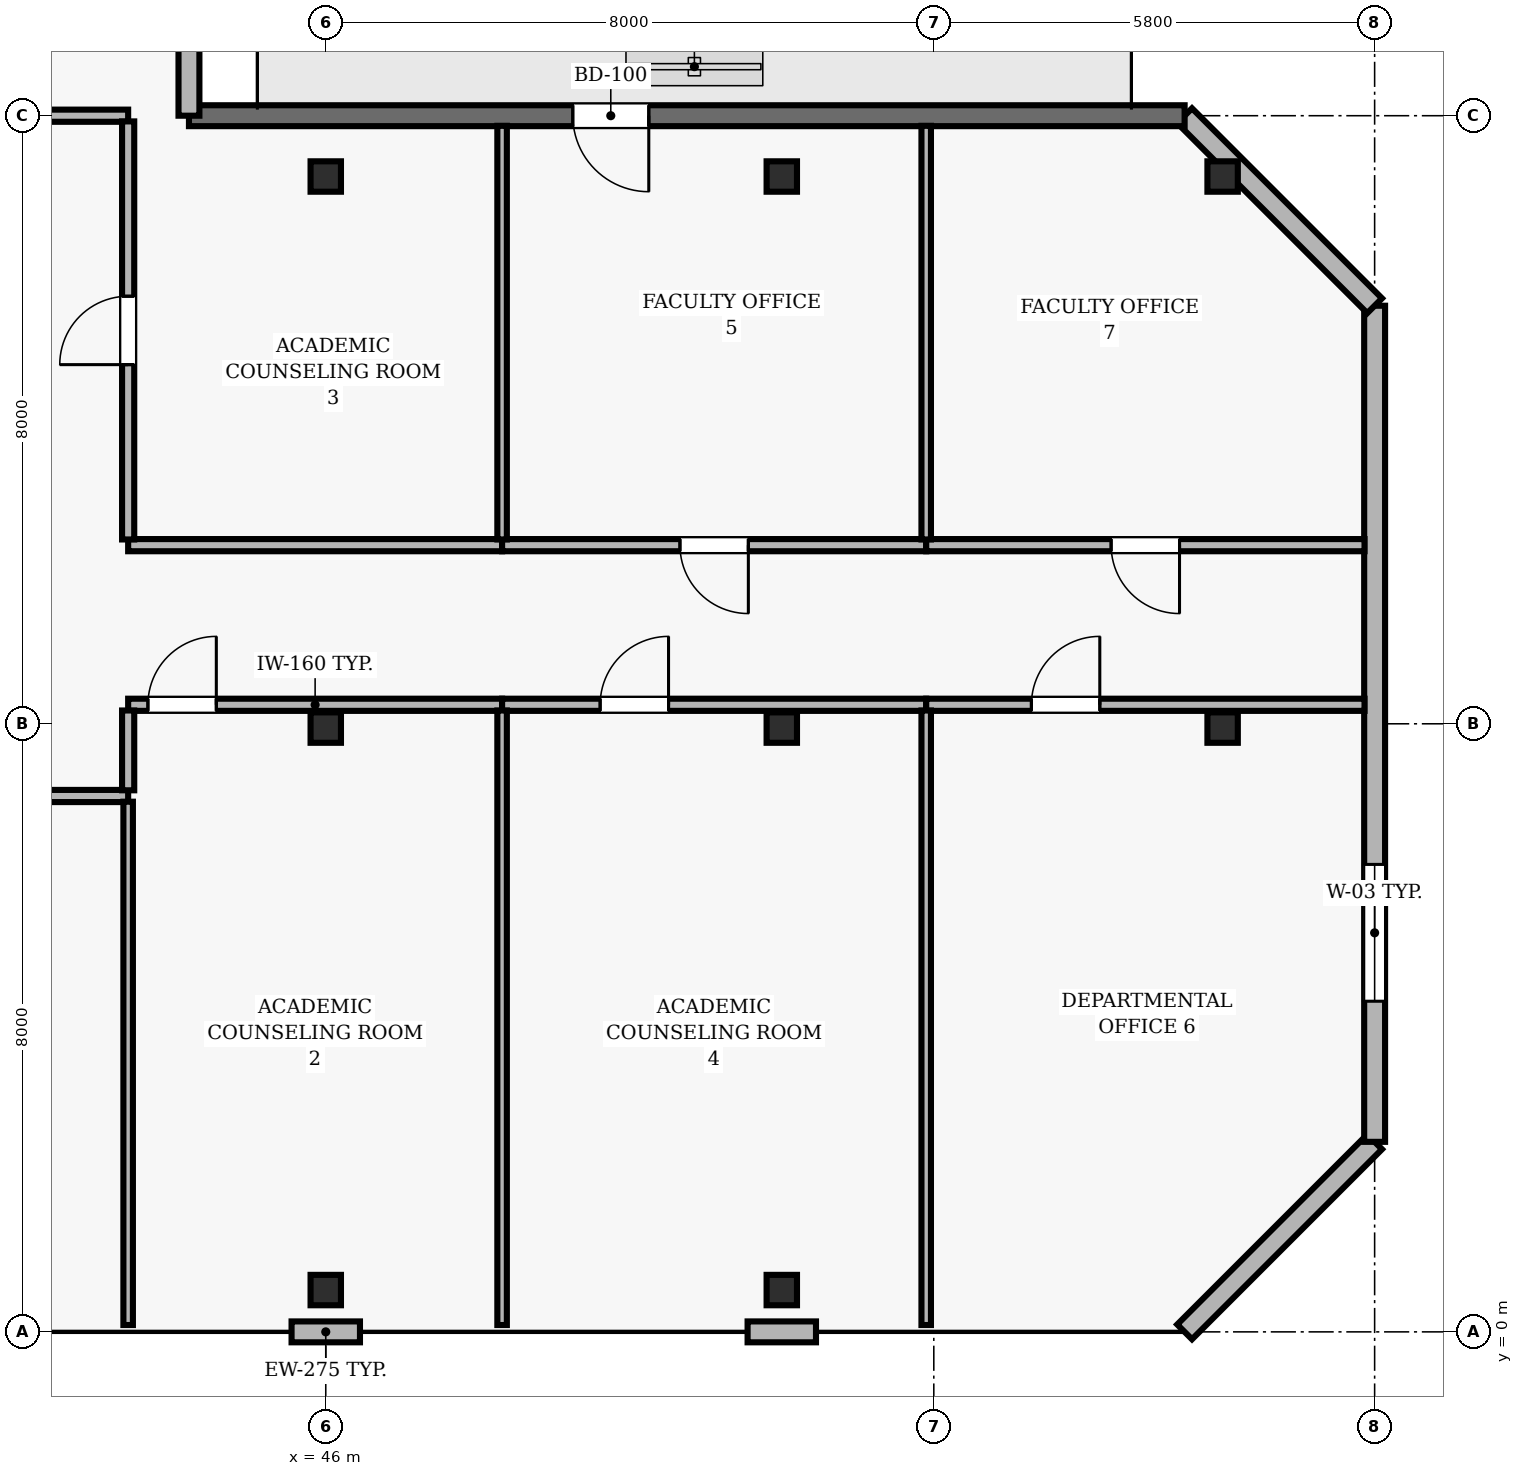
"""IFC4 building model, lengths in metres.
Left out: names, types, materials, properties, quantities, classifications, styles, units other than length and angle.
Written with IfcOpenShell. Run it as: python <this file> out.ifc"""

import sys

from ifc_helpers import new_model, si_unit, direction, frame, frame_2d, origin, origin_2d, place, context, subcontext, project, spatial, rectangle, hollow_rectangle, extrude, element, fill, save


model = new_model("IFC4")
c1 = context("Model", 3, precision=1e-05, world=origin(), true_north=direction((0.0, 1.0)))
c2 = subcontext(c1, "Body", "Model", "MODEL_VIEW")
j1 = project(units=[si_unit("LENGTHUNIT", "METRE"), si_unit("PLANEANGLEUNIT", "RADIAN")], contexts=[c1])
p1 = place(None, origin())
s1 = spatial("IfcSite", under=j1, at=p1, CompositionType="ELEMENT")
p2 = place(p1, origin())
s2 = spatial("IfcBuilding", under=s1, at=p2, CompositionType="ELEMENT")
p3 = place(p2, frame((0.0, 0.0, 295.0)))
s3 = spatial("IfcBuildingStorey", under=s2, at=p3, CompositionType="ELEMENT", Elevation=295.0)
for number, where, z_axis, x_axis in (
    (1, (46.0, 0.55, 0.0), (0.0, 0.0, 1.0), (1.0, 0.0, 0.0)),
    (2, (46.0, 7.95, 0.0), (0.0, 0.0, 1.0), (1.0, 0.0, 0.0)),
    (3, (46.0, 15.2, 0.0), (0.0, 0.0, 1.0), (1.0, 0.0, 0.0)),
    (4, (52.0, 0.55, 0.0), (0.0, 0.0, 1.0), (1.0, 0.0, 0.0)),
    (5, (52.0, 7.95, 0.0), (0.0, 0.0, 1.0), (1.0, 0.0, 0.0)),
    (6, (52.0, 15.2, 0.0), (0.0, 0.0, 1.0), (1.0, 0.0, 0.0)),
    (7, (57.8, 7.95, 0.0), (0.0, 0.0, 1.0), (1.0, 0.0, 0.0)),
    (8, (57.8, 15.2, 0.0), (0.0, 0.0, 1.0), (1.0, 0.0, 0.0)),
):
    element("IfcColumn", number, at=place(p3, frame(where, z_axis=z_axis, x_axis=x_axis)), inside=s3, PredefinedType="COLUMN", context=c2, shape_type="SweptSolid", body=[
        extrude(hollow_rectangle(XDim=0.4, YDim=0.4, WallThickness=0.02, at=origin_2d()), origin(), (0.0, 0.0, 1.0), 3.9),
    ])
for number, where, z_axis, x_axis in (
    (9, (45.55, 0.0, 0.0), (0.0, 0.0, 1.0), (1.0, 0.0, 0.0)),
    (10, (51.55, 0.0, 0.0), (0.0, 0.0, 1.0), (1.0, 0.0, 0.0)),
):
    element("IfcWall", number, at=place(p3, frame(where, z_axis=z_axis, x_axis=x_axis)), inside=s3, PredefinedType="SOLIDWALL", context=c2, shape_type="SweptSolid", body=[
        extrude(rectangle(XDim=0.9, YDim=0.275, at=frame_2d((0.45, 0.0))), origin(), (0.0, 0.0, 1.0), 3.69),
    ])
p4 = place(p3, frame((57.3, 0.0, 0.0), z_axis=(0.0, 0.0, 1.0), x_axis=(0.707106781187, 0.707106781187, 0.0)))
e11 = element("IfcWall", 11, at=p4, inside=s3, PredefinedType="SOLIDWALL", context=c2, shape_type="SweptSolid", body=[
    extrude(rectangle(XDim=3.536, YDim=0.275, at=frame_2d((1.768, 0.0))), origin(), (0.0, 0.0, 1.0), 3.69),
])
p5 = place(p3, frame((59.8, 2.5, 0.0), z_axis=(0.0, 0.0, 1.0), x_axis=(0.0, 1.0, 0.0)))
e12 = element("IfcWall", 12, at=p5, inside=s3, PredefinedType="SOLIDWALL", context=c2, shape_type="SweptSolid", body=[
    extrude(rectangle(XDim=11.0, YDim=0.275, at=frame_2d((5.5, 0.0))), origin(), (0.0, 0.0, 1.0), 3.69),
])
p6 = place(p5, frame((1.85, 0.0, 0.9)))
e13 = element("IfcOpeningElement", 13, at=p6, cuts=e12, PredefinedType="OPENING", context=c2, shape_type="SweptSolid", body=[
    extrude(rectangle(XDim=1.8, YDim=1.6, at=frame_2d((0.9, 0.8))), frame((0.0, 0.147, 0.0), z_axis=(0.0, -1.0, 0.0), x_axis=(1.0, 0.0, 0.0)), (0.0, 0.0, 1.0), 0.295),
])
p7 = place(p3, frame((59.8, 13.5, 0.0), z_axis=(0.0, 0.0, 1.0), x_axis=(-0.707106781187, 0.707106781187, 0.0)))
e14 = element("IfcWall", 14, at=p7, inside=s3, PredefinedType="SOLIDWALL", context=c2, shape_type="SweptSolid", body=[
    extrude(rectangle(XDim=3.536, YDim=0.275, at=frame_2d((1.768, 0.0))), origin(), (0.0, 0.0, 1.0), 3.69),
])
p8 = place(p3, frame((57.3, 16.0, 0.0), z_axis=(0.0, 0.0, 1.0), x_axis=(-1.0, 0.0, 0.0)))
e15 = element("IfcWall", 15, at=p8, inside=s3, PredefinedType="SOLIDWALL", context=c2, shape_type="SweptSolid", body=[
    extrude(rectangle(XDim=13.1, YDim=0.275, at=frame_2d((6.55, 0.0))), origin(), (0.0, 0.0, 1.0), 3.69),
])
p9 = place(p8, frame((7.05, 0.0, 0.0)))
e16 = element("IfcOpeningElement", 16, at=p9, cuts=e15, PredefinedType="OPENING", context=c2, shape_type="SweptSolid", body=[
    extrude(rectangle(XDim=1.0, YDim=2.2, at=frame_2d((0.5, 1.1))), frame((0.0, 0.147, 0.0), z_axis=(0.0, -1.0, 0.0), x_axis=(1.0, 0.0, 0.0)), (0.0, 0.0, 1.0), 0.295),
])
p10 = place(p3, frame((44.2, 16.0, 0.0), z_axis=(0.0, 0.0, 1.0), x_axis=(0.0, 1.0, 0.0)))
e17 = element("IfcWall", 17, at=p10, inside=s3, PredefinedType="SOLIDWALL", context=c2, shape_type="SweptSolid", body=[
    extrude(rectangle(XDim=4.4, YDim=0.275, at=frame_2d((2.2, 0.0))), origin(), (0.0, 0.0, 1.0), 3.69),
])
p11 = place(p3, frame((38.05, 7.05, 0.0), z_axis=(0.0, 0.0, 1.0), x_axis=(1.0, 0.0, 0.0)))
e18 = element("IfcWall", 18, at=p11, inside=s3, PredefinedType="PARTITIONING", context=c2, shape_type="SweptSolid", body=[
    extrude(rectangle(XDim=5.35, YDim=0.16, at=frame_2d((2.675, 0.0))), origin(), (0.0, 0.0, 1.0), 3.69),
])
p12 = place(p11, frame((2.225, 0.0, 0.0)))
e19 = element("IfcOpeningElement", 19, at=p12, cuts=e18, PredefinedType="OPENING", context=c2, shape_type="SweptSolid", body=[
    extrude(rectangle(XDim=0.9, YDim=2.1, at=frame_2d((0.45, 1.05))), frame((0.0, 0.09, 0.0), z_axis=(0.0, -1.0, 0.0), x_axis=(1.0, 0.0, 0.0)), (0.0, 0.0, 1.0), 0.18),
])
p13 = place(p3, frame((43.4, 8.25, 0.0), z_axis=(0.0, 0.0, 1.0), x_axis=(1.0, 0.0, 0.0)))
e20 = element("IfcWall", 20, at=p13, inside=s3, PredefinedType="PARTITIONING", context=c2, shape_type="SweptSolid", body=[
    extrude(rectangle(XDim=4.92, YDim=0.16, at=frame_2d((2.46, 0.0))), origin(), (0.0, 0.0, 1.0), 3.221),
])
p14 = place(p13, frame((0.26, 0.0, 0.0)))
e21 = element("IfcOpeningElement", 21, at=p14, cuts=e20, PredefinedType="OPENING", context=c2, shape_type="SweptSolid", body=[
    extrude(rectangle(XDim=0.9, YDim=2.1, at=frame_2d((0.45, 1.05))), frame((0.0, 0.09, 0.0), z_axis=(0.0, -1.0, 0.0), x_axis=(1.0, 0.0, 0.0)), (0.0, 0.0, 1.0), 0.18),
])
p15 = place(p3, frame((43.4, 16.0, 0.0), z_axis=(0.0, 0.0, 1.0), x_axis=(-1.0, 0.0, 0.0)))
e22 = element("IfcWall", 22, at=p15, inside=s3, PredefinedType="PARTITIONING", context=c2, shape_type="SweptSolid", body=[
    extrude(rectangle(XDim=5.35, YDim=0.16, at=frame_2d((2.675, 0.0))), origin(), (0.0, 0.0, 1.0), 3.39),
])
p16 = place(p15, frame((2.225, 0.0, 0.0)))
e23 = element("IfcOpeningElement", 23, at=p16, cuts=e22, PredefinedType="OPENING", context=c2, shape_type="SweptSolid", body=[
    extrude(rectangle(XDim=0.9, YDim=2.1, at=frame_2d((0.45, 1.05))), frame((0.0, 0.09, 0.0), z_axis=(0.0, -1.0, 0.0), x_axis=(1.0, 0.0, 0.0)), (0.0, 0.0, 1.0), 0.18),
])
p17 = place(p3, frame((48.32, 8.25, 0.0), z_axis=(0.0, 0.0, 1.0), x_axis=(1.0, 0.0, 0.0)))
e24 = element("IfcWall", 24, at=p17, inside=s3, PredefinedType="PARTITIONING", context=c2, shape_type="SweptSolid", body=[
    extrude(rectangle(XDim=5.58, YDim=0.16, at=frame_2d((2.79, 0.0))), origin(), (0.0, 0.0, 1.0), 3.221),
])
p18 = place(p17, frame((1.29, 0.0, 0.0)))
e25 = element("IfcOpeningElement", 25, at=p18, cuts=e24, PredefinedType="OPENING", context=c2, shape_type="SweptSolid", body=[
    extrude(rectangle(XDim=0.9, YDim=2.1, at=frame_2d((0.45, 1.05))), frame((0.0, 0.09, 0.0), z_axis=(0.0, -1.0, 0.0), x_axis=(1.0, 0.0, 0.0)), (0.0, 0.0, 1.0), 0.18),
])
p19 = place(p3, frame((48.32, 10.35, 0.0), z_axis=(0.0, 0.0, 1.0), x_axis=(-1.0, 0.0, 0.0)))
e26 = element("IfcWall", 26, at=p19, inside=s3, PredefinedType="PARTITIONING", context=c2, shape_type="SweptSolid", body=[
    extrude(rectangle(XDim=4.92, YDim=0.16, at=frame_2d((2.46, 0.0))), origin(), (0.0, 0.0, 1.0), 3.372),
])
p20 = place(p3, frame((53.9, 8.25, 0.0), z_axis=(0.0, 0.0, 1.0), x_axis=(1.0, 0.0, 0.0)))
e27 = element("IfcWall", 27, at=p20, inside=s3, PredefinedType="PARTITIONING", context=c2, shape_type="SweptSolid", body=[
    extrude(rectangle(XDim=5.767, YDim=0.16, at=frame_2d((2.884, 0.0))), origin(), (0.0, 0.0, 1.0), 3.221),
])
p21 = place(p20, frame((1.384, 0.0, 0.0)))
e28 = element("IfcOpeningElement", 28, at=p21, cuts=e27, PredefinedType="OPENING", context=c2, shape_type="SweptSolid", body=[
    extrude(rectangle(XDim=0.9, YDim=2.1, at=frame_2d((0.45, 1.05))), frame((0.0, 0.09, 0.0), z_axis=(0.0, -1.0, 0.0), x_axis=(1.0, 0.0, 0.0)), (0.0, 0.0, 1.0), 0.18),
])
p22 = place(p3, frame((53.9, 10.35, 0.0), z_axis=(0.0, 0.0, 1.0), x_axis=(-1.0, 0.0, 0.0)))
e29 = element("IfcWall", 29, at=p22, inside=s3, PredefinedType="PARTITIONING", context=c2, shape_type="SweptSolid", body=[
    extrude(rectangle(XDim=5.58, YDim=0.16, at=frame_2d((2.79, 0.0))), origin(), (0.0, 0.0, 1.0), 3.372),
])
p23 = place(p22, frame((2.34, 0.0, 0.0)))
e30 = element("IfcOpeningElement", 30, at=p23, cuts=e29, PredefinedType="OPENING", context=c2, shape_type="SweptSolid", body=[
    extrude(rectangle(XDim=0.9, YDim=2.1, at=frame_2d((0.45, 1.05))), frame((0.0, 0.09, 0.0), z_axis=(0.0, -1.0, 0.0), x_axis=(1.0, 0.0, 0.0)), (0.0, 0.0, 1.0), 0.18),
])
p24 = place(p3, frame((59.667, 10.35, 0.0), z_axis=(0.0, 0.0, 1.0), x_axis=(-1.0, 0.0, 0.0)))
e31 = element("IfcWall", 31, at=p24, inside=s3, PredefinedType="PARTITIONING", context=c2, shape_type="SweptSolid", body=[
    extrude(rectangle(XDim=5.767, YDim=0.16, at=frame_2d((2.884, 0.0))), origin(), (0.0, 0.0, 1.0), 3.372),
])
p25 = place(p24, frame((2.434, 0.0, 0.0)))
e32 = element("IfcOpeningElement", 32, at=p25, cuts=e31, PredefinedType="OPENING", context=c2, shape_type="SweptSolid", body=[
    extrude(rectangle(XDim=0.9, YDim=2.1, at=frame_2d((0.45, 1.05))), frame((0.0, 0.09, 0.0), z_axis=(0.0, -1.0, 0.0), x_axis=(1.0, 0.0, 0.0)), (0.0, 0.0, 1.0), 0.18),
])
p26 = place(p3, frame((43.4, 0.09, 0.0), z_axis=(0.0, 0.0, 1.0), x_axis=(0.0, 1.0, 0.0)))
e33 = element("IfcWall", 33, at=p26, inside=s3, PredefinedType="PARTITIONING", context=c2, shape_type="SweptSolid", body=[
    extrude(rectangle(XDim=6.885, YDim=0.125, at=frame_2d((3.442, 0.0))), origin(), (0.0, 0.0, 1.0), 3.69),
])
p27 = place(p3, frame((43.4, 7.125, 0.0), z_axis=(0.0, 0.0, 1.0), x_axis=(0.0, 1.0, 0.0)))
e34 = element("IfcWall", 34, at=p27, inside=s3, PredefinedType="PARTITIONING", context=c2, shape_type="SweptSolid", body=[
    extrude(rectangle(XDim=1.05, YDim=0.16, at=frame_2d((0.525, 0.0))), origin(), (0.0, 0.0, 1.0), 3.69),
])
p28 = place(p3, frame((43.4, 10.425, 0.0), z_axis=(0.0, 0.0, 1.0), x_axis=(0.0, 1.0, 0.0)))
e35 = element("IfcWall", 35, at=p28, inside=s3, PredefinedType="PARTITIONING", context=c2, shape_type="SweptSolid", body=[
    extrude(rectangle(XDim=5.5, YDim=0.16, at=frame_2d((2.75, 0.0))), origin(), (0.0, 0.0, 1.0), 3.69),
])
p29 = place(p28, frame((2.3, 0.0, 0.0)))
e36 = element("IfcOpeningElement", 36, at=p29, cuts=e35, PredefinedType="OPENING", context=c2, shape_type="SweptSolid", body=[
    extrude(rectangle(XDim=0.9, YDim=2.1, at=frame_2d((0.45, 1.05))), frame((0.0, 0.09, 0.0), z_axis=(0.0, -1.0, 0.0), x_axis=(1.0, 0.0, 0.0)), (0.0, 0.0, 1.0), 0.18),
])
p30 = place(p3, frame((48.32, 0.09, 0.0), z_axis=(0.0, 0.0, 1.0), x_axis=(0.0, 1.0, 0.0)))
e37 = element("IfcWall", 37, at=p30, inside=s3, PredefinedType="PARTITIONING", context=c2, shape_type="SweptSolid", body=[
    extrude(rectangle(XDim=8.085, YDim=0.125, at=frame_2d((4.042, 0.0))), origin(), (0.0, 0.0, 1.0), 3.69),
])
p31 = place(p3, frame((48.32, 10.425, 0.0), z_axis=(0.0, 0.0, 1.0), x_axis=(0.0, 1.0, 0.0)))
e38 = element("IfcWall", 38, at=p31, inside=s3, PredefinedType="PARTITIONING", context=c2, shape_type="SweptSolid", body=[
    extrude(rectangle(XDim=5.442, YDim=0.125, at=frame_2d((2.721, 0.0))), origin(), (0.0, 0.0, 1.0), 3.69),
])
p32 = place(p3, frame((53.9, 0.09, 0.0), z_axis=(0.0, 0.0, 1.0), x_axis=(0.0, 1.0, 0.0)))
e39 = element("IfcWall", 39, at=p32, inside=s3, PredefinedType="PARTITIONING", context=c2, shape_type="SweptSolid", body=[
    extrude(rectangle(XDim=8.085, YDim=0.125, at=frame_2d((4.042, 0.0))), origin(), (0.0, 0.0, 1.0), 3.69),
])
p33 = place(p3, frame((53.9, 10.425, 0.0), z_axis=(0.0, 0.0, 1.0), x_axis=(0.0, 1.0, 0.0)))
e40 = element("IfcWall", 40, at=p33, inside=s3, PredefinedType="PARTITIONING", context=c2, shape_type="SweptSolid", body=[
    extrude(rectangle(XDim=5.442, YDim=0.125, at=frame_2d((2.721, 0.0))), origin(), (0.0, 0.0, 1.0), 3.69),
])
p34 = place(p6, origin())
e41 = element("IfcWindow", 41, at=p34, inside=s3, PartitioningType="SINGLE_PANEL", PredefinedType="WINDOW", context=c2, shape_type="SweptSolid", body=[
    extrude(rectangle(XDim=1.8, YDim=1.6, at=frame_2d((0.9, 0.8))), frame((0.0, 0.03, 0.0), z_axis=(0.0, -1.0, 0.0), x_axis=(1.0, 0.0, 0.0)), (0.0, 0.0, 1.0), 0.06),
])
fill(e13, e41)
p35 = place(p9, origin())
e42 = element("IfcDoor", 42, at=p35, inside=s3, OperationType="SINGLE_SWING_LEFT", PredefinedType="DOOR", context=c2, shape_type="SweptSolid", body=[
    extrude(rectangle(XDim=1.0, YDim=2.2, at=frame_2d((0.5, 1.1))), frame((0.0, 0.025, 0.0), z_axis=(0.0, -1.0, 0.0), x_axis=(1.0, 0.0, 0.0)), (0.0, 0.0, 1.0), 0.05),
])
fill(e16, e42)
p36 = place(p14, origin())
e43 = element("IfcDoor", 43, at=p36, inside=s3, OperationType="SINGLE_SWING_RIGHT", PredefinedType="DOOR", context=c2, shape_type="SweptSolid", body=[
    extrude(rectangle(XDim=0.9, YDim=2.1, at=frame_2d((0.45, 1.05))), frame((0.0, 0.025, 0.0), z_axis=(0.0, -1.0, 0.0), x_axis=(1.0, 0.0, 0.0)), (0.0, 0.0, 1.0), 0.05),
])
fill(e21, e43)
p37 = place(p29, origin())
e44 = element("IfcDoor", 44, at=p37, inside=s3, OperationType="SINGLE_SWING_LEFT", PredefinedType="DOOR", context=c2, shape_type="SweptSolid", body=[
    extrude(rectangle(XDim=0.9, YDim=2.1, at=frame_2d((0.45, 1.05))), frame((0.0, 0.025, 0.0), z_axis=(0.0, -1.0, 0.0), x_axis=(1.0, 0.0, 0.0)), (0.0, 0.0, 1.0), 0.05),
])
fill(e36, e44)
p38 = place(p18, origin())
e45 = element("IfcDoor", 45, at=p38, inside=s3, OperationType="SINGLE_SWING_RIGHT", PredefinedType="DOOR", context=c2, shape_type="SweptSolid", body=[
    extrude(rectangle(XDim=0.9, YDim=2.1, at=frame_2d((0.45, 1.05))), frame((0.0, 0.025, 0.0), z_axis=(0.0, -1.0, 0.0), x_axis=(1.0, 0.0, 0.0)), (0.0, 0.0, 1.0), 0.05),
])
fill(e25, e45)
p39 = place(p23, origin())
e46 = element("IfcDoor", 46, at=p39, inside=s3, OperationType="SINGLE_SWING_LEFT", PredefinedType="DOOR", context=c2, shape_type="SweptSolid", body=[
    extrude(rectangle(XDim=0.9, YDim=2.1, at=frame_2d((0.45, 1.05))), frame((0.0, 0.025, 0.0), z_axis=(0.0, -1.0, 0.0), x_axis=(1.0, 0.0, 0.0)), (0.0, 0.0, 1.0), 0.05),
])
fill(e30, e46)
p40 = place(p21, origin())
e47 = element("IfcDoor", 47, at=p40, inside=s3, OperationType="SINGLE_SWING_RIGHT", PredefinedType="DOOR", context=c2, shape_type="SweptSolid", body=[
    extrude(rectangle(XDim=0.9, YDim=2.1, at=frame_2d((0.45, 1.05))), frame((0.0, 0.025, 0.0), z_axis=(0.0, -1.0, 0.0), x_axis=(1.0, 0.0, 0.0)), (0.0, 0.0, 1.0), 0.05),
])
fill(e28, e47)
p41 = place(p25, origin())
e48 = element("IfcDoor", 48, at=p41, inside=s3, OperationType="SINGLE_SWING_LEFT", PredefinedType="DOOR", context=c2, shape_type="SweptSolid", body=[
    extrude(rectangle(XDim=0.9, YDim=2.1, at=frame_2d((0.45, 1.05))), frame((0.0, 0.025, 0.0), z_axis=(0.0, -1.0, 0.0), x_axis=(1.0, 0.0, 0.0)), (0.0, 0.0, 1.0), 0.05),
])
fill(e32, e48)
save(model, sys.argv[1])
